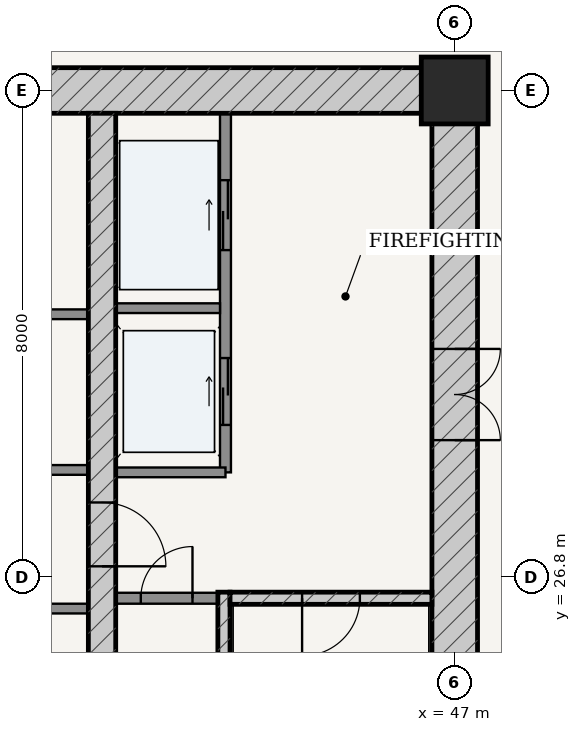
"""IFC4 building model, lengths in metres.
Left out: names, types, materials, properties, quantities, classifications, styles, units other than length and angle.
Written with IfcOpenShell. Run it as: python <this file> out.ifc"""

import sys

from ifc_helpers import new_model, si_unit, direction, frame, frame_2d, origin, origin_2d, place, context, subcontext, project, spatial, rectangle, extrude, source, transform, mapped, element, fill, save


model = new_model("IFC4")
c1 = context("Model", 3, precision=1e-05, world=origin(), true_north=direction((-0.2419218956, 0.970295726276)))
c2 = subcontext(c1, "Body", "Model", "MODEL_VIEW")
j1 = project(units=[si_unit("LENGTHUNIT", "METRE"), si_unit("PLANEANGLEUNIT", "RADIAN")], contexts=[c1])
p1 = place(None, origin())
s1 = spatial("IfcSite", under=j1, at=p1, CompositionType="ELEMENT")
p2 = place(p1, origin())
s2 = spatial("IfcBuilding", under=s1, at=p2, CompositionType="ELEMENT")
p3 = place(p2, frame((0.0, 0.0, -8.4)))
s3 = spatial("IfcBuildingStorey", under=s2, at=p3, CompositionType="ELEMENT", Elevation=-8.4)
p4 = place(p3, frame((47.0, 34.8, 0.0), z_axis=(0.0, 0.0, 1.0), x_axis=(1.0, 0.0, 0.0)))
e1 = element("IfcColumn", 1, at=p4, inside=s3, PredefinedType="COLUMN", context=c2, shape_type="SweptSolid", body=[
    extrude(rectangle(XDim=1.1, YDim=1.1, at=origin_2d()), origin(), (0.0, 0.0, 1.0), 4.2),
])
p5 = place(p3, frame((28.625, 34.8, 0.0), z_axis=(0.0, 0.0, 1.0), x_axis=(1.0, 0.0, 0.0)))
e2 = element("IfcWall", 2, at=p5, inside=s3, PredefinedType="SHEAR", context=c2, shape_type="SweptSolid", body=[
    extrude(rectangle(XDim=18.75, YDim=0.75, at=frame_2d((9.375, 0.0))), origin(), (0.0, 0.0, 1.0), 3.88),
])
p6 = place(p5, frame((8.95, 0.0, 0.0)))
e3 = element("IfcOpeningElement", 3, at=p6, cuts=e2, PredefinedType="OPENING", context=c2, shape_type="SweptSolid", body=[
    extrude(rectangle(XDim=0.85, YDim=2.1, at=frame_2d((0.425, 1.05))), frame((0.0, 0.385, 0.0), z_axis=(0.0, -1.0, 0.0), x_axis=(1.0, 0.0, 0.0)), (0.0, 0.0, 1.0), 0.77),
])
p7 = place(p3, frame((47.0, 19.175, 0.0), z_axis=(0.0, 0.0, 1.0), x_axis=(0.0, 1.0, 0.0)))
e4 = element("IfcWall", 4, at=p7, inside=s3, PredefinedType="SHEAR", context=c2, shape_type="SweptSolid", body=[
    extrude(rectangle(XDim=15.25, YDim=0.75, at=frame_2d((7.625, 0.0))), origin(), (0.0, 0.0, 1.0), 3.88),
])
p8 = place(p7, frame((9.875, 0.0, 0.0)))
e5 = element("IfcOpeningElement", 5, at=p8, cuts=e4, PredefinedType="OPENING", context=c2, shape_type="SweptSolid", body=[
    extrude(rectangle(XDim=1.5, YDim=2.2, at=frame_2d((0.75, 1.1))), frame((0.0, 0.385, 0.0), z_axis=(0.0, -1.0, 0.0), x_axis=(1.0, 0.0, 0.0)), (0.0, 0.0, 1.0), 0.77),
])
p9 = place(p3, frame((43.205, 19.175, 0.0), z_axis=(0.0, 0.0, 1.0), x_axis=(0.0, 1.0, 0.0)))
e6 = element("IfcWall", 6, at=p9, inside=s3, PredefinedType="SOLIDWALL", context=c2, shape_type="SweptSolid", body=[
    extrude(rectangle(XDim=7.375, YDim=0.2, at=frame_2d((3.688, 0.0))), origin(), (0.0, 0.0, 1.0), 3.88),
])
p10 = place(p3, frame((43.305, 26.45, 0.0), z_axis=(0.0, 0.0, 1.0), x_axis=(1.0, 0.0, 0.0)))
e7 = element("IfcWall", 7, at=p10, inside=s3, PredefinedType="SOLIDWALL", context=c2, shape_type="SweptSolid", body=[
    extrude(rectangle(XDim=3.32, YDim=0.2, at=frame_2d((1.66, 0.0))), origin(), (0.0, 0.0, 1.0), 3.88),
])
p11 = place(p10, frame((1.185, 0.0, 0.0)))
e8 = element("IfcOpeningElement", 8, at=p11, cuts=e7, PredefinedType="OPENING", context=c2, shape_type="SweptSolid", body=[
    extrude(rectangle(XDim=0.95, YDim=2.15, at=frame_2d((0.475, 1.075))), frame((0.0, 0.11, 0.0), z_axis=(0.0, -1.0, 0.0), x_axis=(1.0, 0.0, 0.0)), (0.0, 0.0, 1.0), 0.22),
])
p12 = place(p3, frame((41.2, 19.175, 0.0), z_axis=(0.0, 0.0, 1.0), x_axis=(0.0, 1.0, 0.0)))
e9 = element("IfcWall", 9, at=p12, inside=s3, PredefinedType="SHEAR", context=c2, shape_type="SweptSolid", body=[
    extrude(rectangle(XDim=15.25, YDim=0.45, at=frame_2d((7.625, 0.0))), origin(), (0.0, 0.0, 1.0), 3.88),
])
p13 = place(p12, frame((7.8, 0.0, 0.0)))
e10 = element("IfcOpeningElement", 10, at=p13, cuts=e9, PredefinedType="OPENING", context=c2, shape_type="SweptSolid", body=[
    extrude(rectangle(XDim=1.05, YDim=2.15, at=frame_2d((0.525, 1.075))), frame((0.0, 0.235, 0.0), z_axis=(0.0, -1.0, 0.0), x_axis=(1.0, 0.0, 0.0)), (0.0, 0.0, 1.0), 0.47),
])
p14 = place(p3, frame((41.425, 26.45, 0.0), z_axis=(0.0, 0.0, 1.0), x_axis=(1.0, 0.0, 0.0)))
e11 = element("IfcWall", 11, at=p14, inside=s3, PredefinedType="PARTITIONING", context=c2, shape_type="SweptSolid", body=[
    extrude(rectangle(XDim=1.675, YDim=0.18, at=frame_2d((0.837, 0.0))), origin(), (0.0, 0.0, 1.0), 3.88),
])
p15 = place(p14, frame((0.413, 0.0, 0.0)))
e12 = element("IfcOpeningElement", 12, at=p15, cuts=e11, PredefinedType="OPENING", context=c2, shape_type="SweptSolid", body=[
    extrude(rectangle(XDim=0.85, YDim=2.1, at=frame_2d((0.425, 1.05))), frame((0.0, 0.1, 0.0), z_axis=(0.0, -1.0, 0.0), x_axis=(1.0, 0.0, 0.0)), (0.0, 0.0, 1.0), 0.2),
])
p16 = place(p3, frame((43.23, 28.52, 0.0), z_axis=(0.0, 0.0, 1.0), x_axis=(0.0, 1.0, 0.0)))
e13 = element("IfcWall", 13, at=p16, inside=s3, PredefinedType="PARTITIONING", context=c2, shape_type="SweptSolid", body=[
    extrude(rectangle(XDim=5.905, YDim=0.18, at=frame_2d((2.953, 0.0))), origin(), (0.0, 0.0, 1.0), 3.88),
])
p17 = place(p16, frame((3.655, 0.0, 0.0)))
e14 = element("IfcOpeningElement", 14, at=p17, cuts=e13, PredefinedType="OPENING", context=c2, shape_type="SweptSolid", body=[
    extrude(rectangle(XDim=1.15, YDim=2.2, at=frame_2d((0.575, 1.1))), frame((0.0, 0.1, 0.0), z_axis=(0.0, -1.0, 0.0), x_axis=(1.0, 0.0, 0.0)), (0.0, 0.0, 1.0), 0.2),
])
p18 = place(p16, frame((0.78, 0.0, 0.0)))
e15 = element("IfcOpeningElement", 15, at=p18, cuts=e13, PredefinedType="OPENING", context=c2, shape_type="SweptSolid", body=[
    extrude(rectangle(XDim=1.1, YDim=2.2, at=frame_2d((0.55, 1.1))), frame((0.0, 0.1, 0.0), z_axis=(0.0, -1.0, 0.0), x_axis=(1.0, 0.0, 0.0)), (0.0, 0.0, 1.0), 0.2),
])
p19 = place(p3, frame((41.425, 31.22, 0.0), z_axis=(0.0, 0.0, 1.0), x_axis=(1.0, 0.0, 0.0)))
e16 = element("IfcWall", 16, at=p19, inside=s3, PredefinedType="PARTITIONING", context=c2, shape_type="SweptSolid", body=[
    extrude(rectangle(XDim=1.715, YDim=0.16, at=frame_2d((0.857, 0.0))), origin(), (0.0, 0.0, 1.0), 3.88),
])
p20 = place(p3, frame((41.425, 28.52, 0.0), z_axis=(0.0, 0.0, 1.0), x_axis=(1.0, 0.0, 0.0)))
e17 = element("IfcWall", 17, at=p20, inside=s3, PredefinedType="PARTITIONING", context=c2, shape_type="SweptSolid", body=[
    extrude(rectangle(XDim=1.805, YDim=0.16, at=frame_2d((0.902, 0.0))), origin(), (0.0, 0.0, 1.0), 3.88),
])
for number, where, z_axis, x_axis in (
    (18, (35.025, 28.56, 0.0), (0.0, 0.0, 1.0), (1.0, 0.0, 0.0)),
    (19, (35.025, 31.12, 0.0), (0.0, 0.0, 1.0), (1.0, 0.0, 0.0)),
    (20, (35.025, 26.28, 0.0), (0.0, 0.0, 1.0), (1.0, 0.0, 0.0)),
):
    element("IfcWall", number, at=place(p3, frame(where, z_axis=z_axis, x_axis=x_axis)), inside=s3, PredefinedType="PARTITIONING", context=c2, shape_type="SweptSolid", body=[
        extrude(rectangle(XDim=5.95, YDim=0.16, at=frame_2d((2.975, 0.0))), origin(), (0.0, 0.0, 1.0), 3.88),
    ])
m1 = source(origin(), c2, "Body", "SweptSolid", [
    extrude(rectangle(XDim=1.5, YDim=2.2, at=frame_2d((0.75, 1.1))), frame((0.0, 0.025, 0.0), z_axis=(0.0, -1.0, 0.0), x_axis=(1.0, 0.0, 0.0)), (0.0, 0.0, 1.0), 0.05),
])
p21 = place(p8, frame((1.5, 0.0, 0.0), z_axis=(0.0, 0.0, 1.0), x_axis=(-1.0, 0.0, 0.0)))
e21 = element("IfcDoor", 21, at=p21, inside=s3, OperationType="DOUBLE_DOOR_SINGLE_SWING", PredefinedType="DOOR", context=c2, shape_type="MappedRepresentation", body=[
    mapped(m1, transform((0.0, 0.0, 0.0), scale=1.0)),
])
fill(e5, e21)
m2 = source(origin(), c2, "Body", "SweptSolid", [
    extrude(rectangle(XDim=1.05, YDim=2.15, at=frame_2d((0.525, 1.075))), frame((0.0, 0.025, 0.0), z_axis=(0.0, -1.0, 0.0), x_axis=(1.0, 0.0, 0.0)), (0.0, 0.0, 1.0), 0.05),
])
p22 = place(p13, frame((1.05, 0.0, 0.0), z_axis=(0.0, 0.0, 1.0), x_axis=(-1.0, 0.0, 0.0)))
e22 = element("IfcDoor", 22, at=p22, inside=s3, OperationType="SINGLE_SWING_RIGHT", PredefinedType="DOOR", context=c2, shape_type="MappedRepresentation", body=[
    mapped(m2, transform((0.0, 0.0, 0.0), scale=1.0)),
])
fill(e10, e22)
m3 = source(origin(), c2, "Body", "SweptSolid", [
    extrude(rectangle(XDim=0.95, YDim=2.15, at=frame_2d((0.475, 1.075))), frame((0.0, 0.025, 0.0), z_axis=(0.0, -1.0, 0.0), x_axis=(1.0, 0.0, 0.0)), (0.0, 0.0, 1.0), 0.05),
])
p23 = place(p11, frame((0.95, 0.0, 0.0), z_axis=(0.0, 0.0, 1.0), x_axis=(-1.0, 0.0, 0.0)))
e23 = element("IfcDoor", 23, at=p23, inside=s3, OperationType="SINGLE_SWING_RIGHT", PredefinedType="DOOR", context=c2, shape_type="MappedRepresentation", body=[
    mapped(m3, transform((0.0, 0.0, 0.0), scale=1.0)),
])
fill(e8, e23)
m4 = source(origin(), c2, "Body", "SweptSolid", [
    extrude(rectangle(XDim=0.85, YDim=2.1, at=frame_2d((0.425, 1.05))), frame((0.0, 0.025, 0.0), z_axis=(0.0, -1.0, 0.0), x_axis=(1.0, 0.0, 0.0)), (0.0, 0.0, 1.0), 0.05),
])
p24 = place(p15, origin())
e24 = element("IfcDoor", 24, at=p24, inside=s3, OperationType="SINGLE_SWING_RIGHT", PredefinedType="DOOR", context=c2, shape_type="MappedRepresentation", body=[
    mapped(m4, transform((0.0, 0.0, 0.0), scale=1.0)),
])
fill(e12, e24)
m5 = source(origin(), c2, "Body", "SweptSolid", [
    extrude(rectangle(XDim=1.15, YDim=2.2, at=frame_2d((0.575, 1.1))), frame((0.0, 0.025, 0.0), z_axis=(0.0, -1.0, 0.0), x_axis=(1.0, 0.0, 0.0)), (0.0, 0.0, 1.0), 0.05),
])
p25 = place(p17, origin())
e25 = element("IfcDoor", 25, at=p25, inside=s3, OperationType="DOUBLE_DOOR_SLIDING", PredefinedType="DOOR", context=c2, shape_type="MappedRepresentation", body=[
    mapped(m5, transform((0.0, 0.0, 0.0), scale=1.0)),
])
fill(e14, e25)
m6 = source(origin(), c2, "Body", "SweptSolid", [
    extrude(rectangle(XDim=1.1, YDim=2.2, at=frame_2d((0.55, 1.1))), frame((0.0, 0.025, 0.0), z_axis=(0.0, -1.0, 0.0), x_axis=(1.0, 0.0, 0.0)), (0.0, 0.0, 1.0), 0.05),
])
p26 = place(p18, origin())
e26 = element("IfcDoor", 26, at=p26, inside=s3, OperationType="DOUBLE_DOOR_SLIDING", PredefinedType="DOOR", context=c2, shape_type="MappedRepresentation", body=[
    mapped(m6, transform((0.0, 0.0, 0.0), scale=1.0)),
])
fill(e15, e26)
save(model, sys.argv[1])
